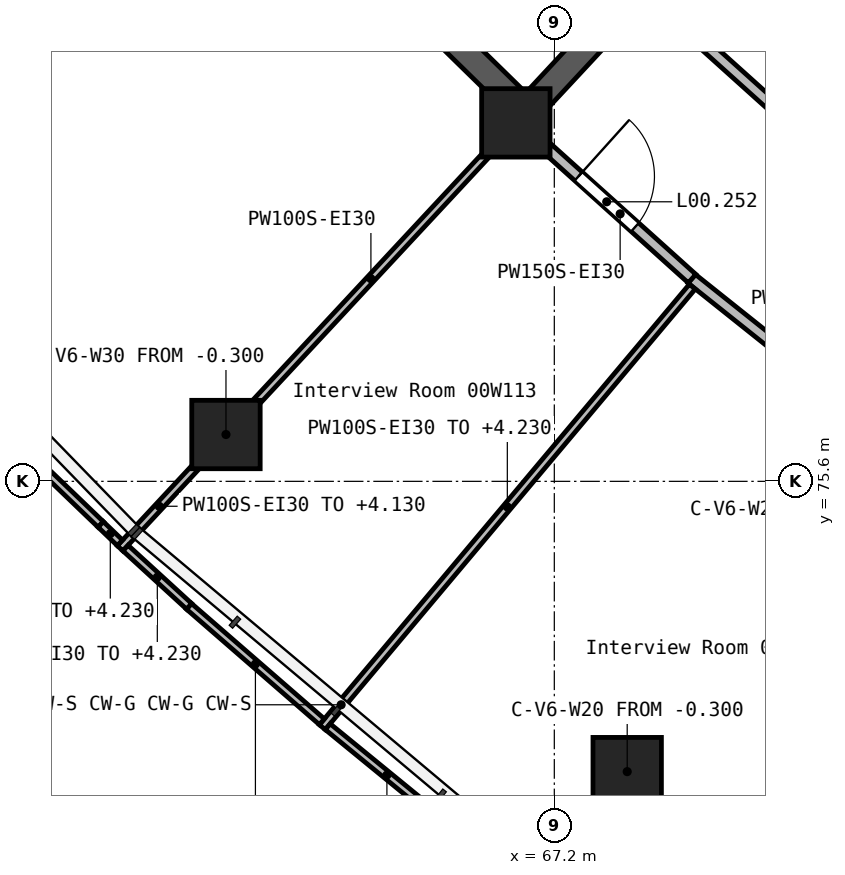
"""IFC4 building model, lengths in metres.
Left out: names, types, materials, properties, quantities, classifications, styles, units other than length and angle.
Written with IfcOpenShell. Run it as: python <this file> out.ifc"""

import sys

from ifc_helpers import new_model, si_unit, direction, frame, frame_2d, origin, origin_2d, place, context, subcontext, project, spatial, rectangle, extrude, element, fill, save


model = new_model("IFC4")
c1 = context("Model", 3, precision=1e-05, world=origin(), true_north=direction((0.0, 1.0)))
c2 = subcontext(c1, "Body", "Model", "MODEL_VIEW")
j1 = project(units=[si_unit("LENGTHUNIT", "METRE"), si_unit("PLANEANGLEUNIT", "RADIAN")], contexts=[c1])
p1 = place(None, origin())
s1 = spatial("IfcSite", under=j1, at=p1, CompositionType="ELEMENT")
p2 = place(p1, origin())
s2 = spatial("IfcBuilding", under=s1, at=p2, CompositionType="ELEMENT")
p3 = place(p2, origin())
s3 = spatial("IfcBuildingStorey", under=s2, at=p3, CompositionType="ELEMENT", Elevation=0.0)
for number, where, z_axis, x_axis in (
    (1, (62.88, 76.216, -0.3), (0.0, 0.0, 1.0), (1.0, 0.0, 0.0)),
    (2, (66.694, 80.316, -0.3), (0.0, 0.0, 1.0), (1.0, 0.0, 0.0)),
    (3, (68.159, 71.781, -0.3), (0.0, 0.0, 1.0), (1.0, 0.0, 0.0)),
):
    element("IfcColumn", number, at=place(p3, frame(where, z_axis=z_axis, x_axis=x_axis)), inside=s3, PredefinedType="COLUMN", context=c2, shape_type="SweptSolid", body=[
        extrude(rectangle(XDim=0.9, YDim=0.9, at=origin_2d()), origin(), (0.0, 0.0, 1.0), 5.7),
    ])
p4 = place(p3, frame((64.579, 82.666, -0.3), z_axis=(0.0, 0.0, 1.0), x_axis=(0.714695816666, -0.699435407769, 0.0)))
e4 = element("IfcWall", 4, at=p4, inside=s3, PredefinedType="SHEAR", context=c2, shape_type="SweptSolid", body=[
    extrude(rectangle(XDim=2.976, YDim=0.35, at=frame_2d((1.488, 0.0))), origin(), (0.0, 0.0, 1.0), 5.7),
])
p5 = place(p3, frame((66.712, 80.334, -0.3), z_axis=(0.0, 0.0, 1.0), x_axis=(0.681084356202, 0.732204957465, 0.0)))
e5 = element("IfcWall", 5, at=p5, inside=s3, PredefinedType="SHEAR", context=c2, shape_type="SweptSolid", body=[
    extrude(rectangle(XDim=5.75, YDim=0.35, at=frame_2d((2.875, 0.0))), origin(), (0.0, 0.0, 1.0), 5.7),
])
p6 = place(p3, frame((69.006, 78.267, 0.0), z_axis=(0.0, 0.0, 1.0), x_axis=(0.781841800916, -0.623476862715, 0.0)))
e6 = element("IfcWall", 6, at=p6, inside=s3, PredefinedType="PARTITIONING", context=c2, shape_type="SweptSolid", body=[
    extrude(rectangle(XDim=2.69, YDim=0.15, at=frame_2d((1.345, 0.0))), origin(), (0.0, 0.0, 1.0), 5.05),
])
p7 = place(p3, frame((67.12, 79.971, 0.0), z_axis=(0.0, 0.0, 1.0), x_axis=(0.743284610851, -0.668975326355, 0.0)))
e7 = element("IfcWall", 7, at=p7, inside=s3, PredefinedType="PARTITIONING", context=c2, shape_type="SweptSolid", body=[
    extrude(rectangle(XDim=2.546, YDim=0.15, at=frame_2d((1.273, 0.0))), origin(), (0.0, 0.0, 1.0), 5.05),
])
p8 = place(p7, frame((0.535, 0.0, 0.0)))
e8 = element("IfcOpeningElement", 8, at=p8, cuts=e7, PredefinedType="OPENING", context=c2, shape_type="SweptSolid", body=[
    extrude(rectangle(XDim=1.0, YDim=2.1, at=frame_2d((0.5, 1.05))), frame((0.0, 0.085, 0.0), z_axis=(0.0, -1.0, 0.0), x_axis=(1.0, 0.0, 0.0)), (0.0, 0.0, 1.0), 0.17),
])
p9 = place(p3, frame((68.478, 81.974, 0.0), z_axis=(0.0, 0.0, 1.0), x_axis=(0.743546016741, -0.66868476952, 0.0)))
e9 = element("IfcWall", 9, at=p9, inside=s3, PredefinedType="PARTITIONING", context=c2, shape_type="SweptSolid", body=[
    extrude(rectangle(XDim=2.795, YDim=0.15, at=frame_2d((1.397, 0.0))), origin(), (0.0, 0.0, 1.0), 5.05),
])
p10 = place(p3, frame((61.487, 74.719, 0.0), z_axis=(0.0, 0.0, 1.0), x_axis=(0.681355821593, 0.731952351168, 0.0)))
e10 = element("IfcWall", 10, at=p10, inside=s3, PredefinedType="PARTITIONING", context=c2, shape_type="SweptSolid", body=[
    extrude(rectangle(XDim=1.51, YDim=0.1, at=frame_2d((0.755, 0.0))), origin(), (0.0, 0.0, 1.0), 4.13),
])
p11 = place(p3, frame((63.244, 76.607, 0.0), z_axis=(0.0, 0.0, 1.0), x_axis=(0.681263193371, 0.732038565485, 0.0)))
e11 = element("IfcWall", 11, at=p11, inside=s3, PredefinedType="PARTITIONING", context=c2, shape_type="SweptSolid", body=[
    extrude(rectangle(XDim=4.529, YDim=0.1, at=frame_2d((2.265, 0.0))), origin(), (0.0, 0.0, 1.0), 5.05),
])
p12 = place(p3, frame((69.81, 68.079, 0.0), z_axis=(0.0, 0.0, 1.0), x_axis=(0.562401761837, 0.826864111135, 0.0)))
e12 = element("IfcWall", 12, at=p12, inside=s3, PredefinedType="PARTITIONING", context=c2, shape_type="SweptSolid", body=[
    extrude(rectangle(XDim=7.57, YDim=0.1, at=frame_2d((3.785, 0.0))), origin(), (0.0, 0.0, 1.0), 5.05),
])
p13 = place(p3, frame((64.148, 72.366, 0.0), z_axis=(0.0, 0.0, 1.0), x_axis=(0.64315880068, 0.76573282358, 0.0)))
e13 = element("IfcWall", 13, at=p13, inside=s3, PredefinedType="PARTITIONING", context=c2, shape_type="SweptSolid", body=[
    extrude(rectangle(XDim=7.569, YDim=0.1, at=frame_2d((3.784, 0.0))), origin(), (0.0, 0.0, 1.0), 4.23),
])
p14 = place(p3, frame((62.393, 73.956, 0.0), z_axis=(0.0, 0.0, 1.0), x_axis=(0.754968559449, -0.655760988657, 0.0)))
e14 = element("IfcWall", 14, at=p14, inside=s3, PredefinedType="PARTITIONING", context=c2, shape_type="SweptSolid", body=[
    extrude(rectangle(XDim=2.316, YDim=0.1, at=frame_2d((1.158, 0.0))), origin(), (0.0, 0.0, 1.0), 4.23),
])
p15 = place(p3, frame((59.849, 76.362, 0.0), z_axis=(0.0, 0.0, 1.0), x_axis=(0.721349151434, -0.692571585993, 0.0)))
e15 = element("IfcWall", 15, at=p15, inside=s3, PredefinedType="PARTITIONING", context=c2, shape_type="SweptSolid", body=[
    extrude(rectangle(XDim=1.917, YDim=0.1, at=frame_2d((0.958, 0.0))), origin(), (0.0, 0.0, 1.0), 5.05),
])
p16 = place(p3, frame((61.232, 75.034, 0.0), z_axis=(0.0, 0.0, 1.0), x_axis=(0.721261855582, -0.692662497672, 0.0)))
e16 = element("IfcWall", 16, at=p16, inside=s3, PredefinedType="PARTITIONING", context=c2, shape_type="SweptSolid", body=[
    extrude(rectangle(XDim=0.35, YDim=0.1, at=frame_2d((0.175, 0.0))), origin(), (0.0, 0.0, 1.0), 4.23),
])
p17 = place(p3, frame((64.219, 72.372, 0.0), z_axis=(0.0, 0.0, 1.0), x_axis=(0.774189909743, -0.632953381895, 0.0)))
e17 = element("IfcWall", 17, at=p17, inside=s3, PredefinedType="PARTITIONING", context=c2, shape_type="SweptSolid", body=[
    extrude(rectangle(XDim=2.01, YDim=0.1, at=frame_2d((1.005, 0.0))), origin(), (0.0, 0.0, 1.0), 4.23),
])
p18 = place(p3, frame((61.558, 74.722, 0.0), z_axis=(0.0, 0.0, 1.0), x_axis=(0.737618418346, -0.67521779369, 0.0)))
e18 = element("IfcWall", 18, at=p18, inside=s3, PredefinedType="PARTITIONING", context=c2, shape_type="SweptSolid", body=[
    extrude(rectangle(XDim=1.135, YDim=0.1, at=frame_2d((0.567, 0.0))), origin(), (0.0, 0.0, 1.0), 4.23),
])
p19 = place(p8, frame((1.0, 0.0, 0.0), z_axis=(0.0, 0.0, 1.0), x_axis=(-1.0, 0.0, 0.0)))
e19 = element("IfcDoor", 19, at=p19, inside=s3, OperationType="SINGLE_SWING_RIGHT", PredefinedType="DOOR", context=c2, shape_type="SweptSolid", body=[
    extrude(rectangle(XDim=1.0, YDim=2.1, at=frame_2d((0.5, 1.05))), frame((0.0, 0.025, 0.0), z_axis=(0.0, -1.0, 0.0), x_axis=(1.0, 0.0, 0.0)), (0.0, 0.0, 1.0), 0.05),
])
fill(e8, e19)
save(model, sys.argv[1])
